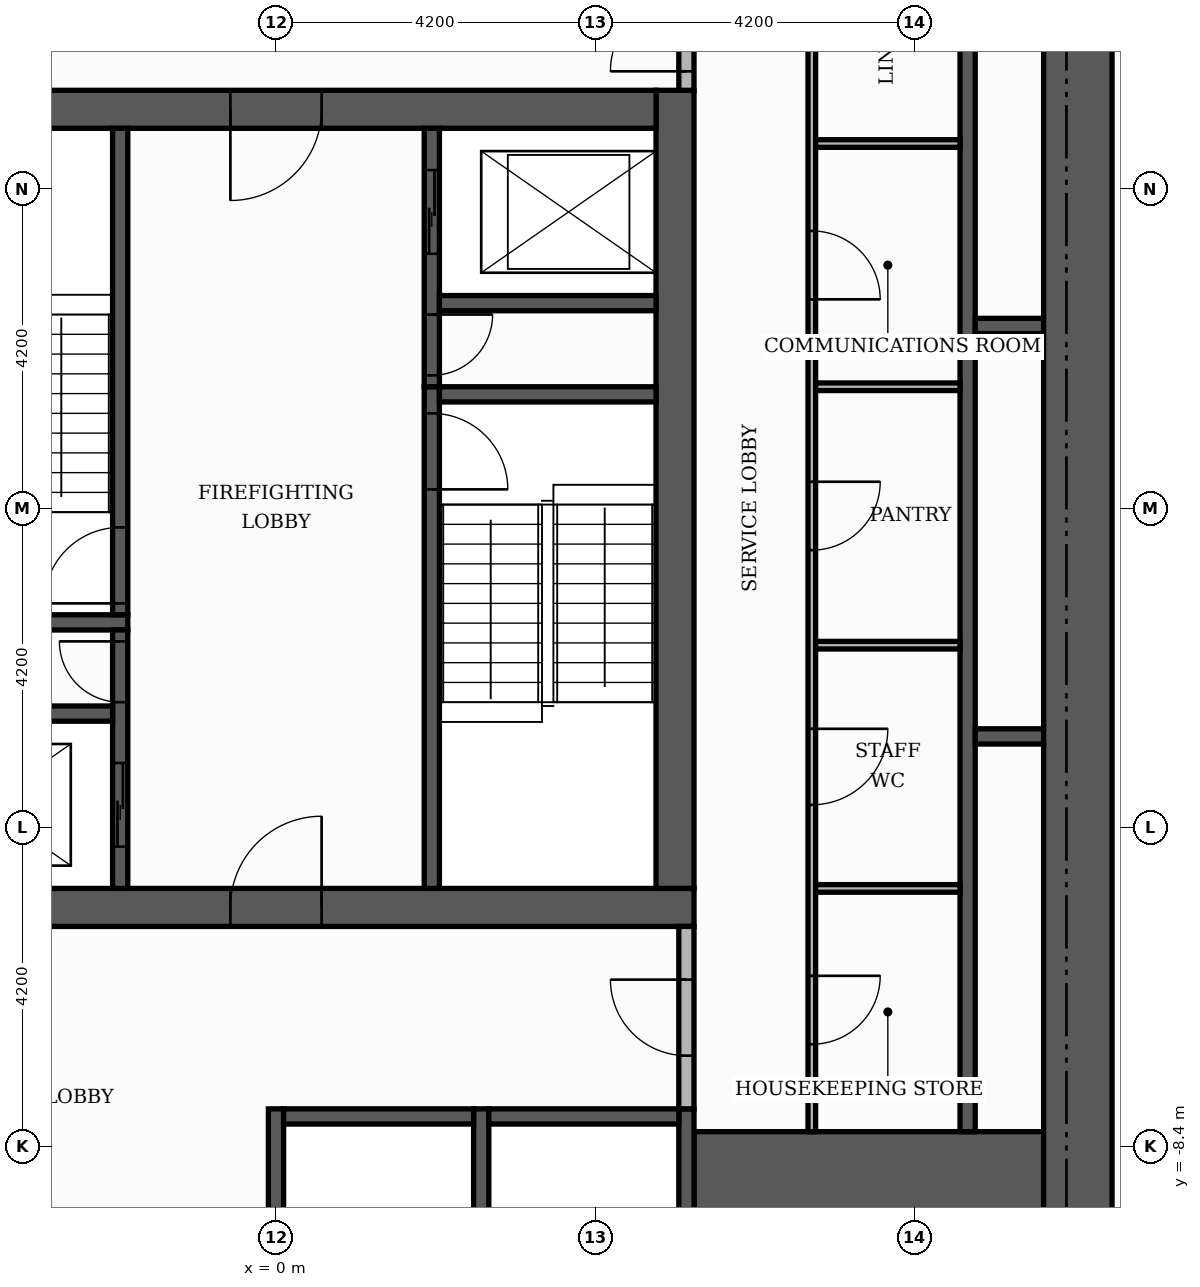
"""IFC4 building model, lengths in metres.
Left out: names, types, materials, properties, quantities, classifications, styles, units other than length and angle.
Written with IfcOpenShell. Run it as: python <this file> out.ifc"""

import sys

from ifc_helpers import new_model, si_unit, direction, frame, frame_2d, origin, place, context, subcontext, project, spatial, rectangle, extrude, element, fill, save


model = new_model("IFC4")
c1 = context("Model", 3, precision=1e-05, world=origin(), true_north=direction((0.0, 1.0)))
c2 = subcontext(c1, "Body", "Model", "MODEL_VIEW")
j1 = project(units=[si_unit("LENGTHUNIT", "METRE"), si_unit("PLANEANGLEUNIT", "RADIAN")], contexts=[c1])
p1 = place(None, origin())
s1 = spatial("IfcSite", under=j1, at=p1, CompositionType="ELEMENT")
p2 = place(p1, origin())
s2 = spatial("IfcBuilding", under=s1, at=p2, CompositionType="ELEMENT")
p3 = place(p2, frame((0.0, 0.0, 42.6)))
s3 = spatial("IfcBuildingStorey", under=s2, at=p3, CompositionType="ELEMENT", Elevation=42.6)
p4 = place(p3, frame((-5.5, -5.25, 0.0), z_axis=(0.0, 0.0, 1.0), x_axis=(1.0, 0.0, 0.0)))
e1 = element("IfcWall", 1, at=p4, inside=s3, PredefinedType="SHEAR", context=c2, shape_type="SweptSolid", body=[
    extrude(rectangle(XDim=11.0, YDim=0.5, at=frame_2d((5.5, 0.0))), origin(), (0.0, 0.0, 1.0), 3.48),
])
p5 = place(p4, frame((4.9, 0.0, 0.0)))
e2 = element("IfcOpeningElement", 2, at=p5, cuts=e1, PredefinedType="OPENING", context=c2, shape_type="SweptSolid", body=[
    extrude(rectangle(XDim=1.2, YDim=2.1, at=frame_2d((0.6, 1.05))), frame((0.0, 0.26, 0.0), z_axis=(0.0, -1.0, 0.0), x_axis=(1.0, 0.0, 0.0)), (0.0, 0.0, 1.0), 0.52),
])
p6 = place(p3, frame((5.25, -5.0, 0.0), z_axis=(0.0, 0.0, 1.0), x_axis=(0.0, 1.0, 0.0)))
e3 = element("IfcWall", 3, at=p6, inside=s3, PredefinedType="SHEAR", context=c2, shape_type="SweptSolid", body=[
    extrude(rectangle(XDim=10.5, YDim=0.5, at=frame_2d((5.25, 0.0))), origin(), (0.0, 0.0, 1.0), 3.48),
])
p7 = place(p3, frame((-5.0, 5.25, 0.0), z_axis=(0.0, 0.0, 1.0), x_axis=(1.0, 0.0, 0.0)))
e4 = element("IfcWall", 4, at=p7, inside=s3, PredefinedType="SHEAR", context=c2, shape_type="SweptSolid", body=[
    extrude(rectangle(XDim=10.0, YDim=0.5, at=frame_2d((5.0, 0.0))), origin(), (0.0, 0.0, 1.0), 3.48),
])
p8 = place(p7, frame((4.4, 0.0, 0.0)))
e5 = element("IfcOpeningElement", 5, at=p8, cuts=e4, PredefinedType="OPENING", context=c2, shape_type="SweptSolid", body=[
    extrude(rectangle(XDim=1.2, YDim=2.1, at=frame_2d((0.6, 1.05))), frame((0.0, 0.26, 0.0), z_axis=(0.0, -1.0, 0.0), x_axis=(1.0, 0.0, 0.0)), (0.0, 0.0, 1.0), 0.52),
])
p9 = place(p3, frame((5.5, -9.15, 0.0), z_axis=(0.0, 0.0, 1.0), x_axis=(1.0, 0.0, 0.0)))
e6 = element("IfcWall", 6, at=p9, inside=s3, PredefinedType="SHEAR", context=c2, shape_type="SweptSolid", body=[
    extrude(rectangle(XDim=4.6, YDim=1.9, at=frame_2d((2.3, 0.0))), origin(), (0.0, 0.0, 1.0), 3.48),
])
p10 = place(p3, frame((2.05, -5.0, 0.0), z_axis=(0.0, 0.0, 1.0), x_axis=(0.0, 1.0, 0.0)))
e7 = element("IfcWall", 7, at=p10, inside=s3, PredefinedType="SHEAR", context=c2, shape_type="SweptSolid", body=[
    extrude(rectangle(XDim=6.6, YDim=0.2, at=frame_2d((3.3, 0.0))), origin(), (0.0, 0.0, 1.0), 3.48),
])
p11 = place(p10, frame((5.25, 0.0, 0.0)))
e8 = element("IfcOpeningElement", 8, at=p11, cuts=e7, PredefinedType="OPENING", context=c2, shape_type="SweptSolid", body=[
    extrude(rectangle(XDim=1.0, YDim=2.1, at=frame_2d((0.5, 1.05))), frame((0.0, 0.11, 0.0), z_axis=(0.0, -1.0, 0.0), x_axis=(1.0, 0.0, 0.0)), (0.0, 0.0, 1.0), 0.22),
])
p12 = place(p3, frame((-5.0, -1.5, 0.0), z_axis=(0.0, 0.0, 1.0), x_axis=(1.0, 0.0, 0.0)))
e9 = element("IfcWall", 9, at=p12, inside=s3, PredefinedType="SHEAR", context=c2, shape_type="SweptSolid", body=[
    extrude(rectangle(XDim=3.05, YDim=0.2, at=frame_2d((1.525, 0.0))), origin(), (0.0, 0.0, 1.0), 3.48),
])
p13 = place(p3, frame((-2.05, -1.4, 0.0), z_axis=(0.0, 0.0, 1.0), x_axis=(0.0, 1.0, 0.0)))
e10 = element("IfcWall", 10, at=p13, inside=s3, PredefinedType="SHEAR", context=c2, shape_type="SweptSolid", body=[
    extrude(rectangle(XDim=6.4, YDim=0.2, at=frame_2d((3.2, 0.0))), origin(), (0.0, 0.0, 1.0), 3.48),
])
p14 = place(p13, frame((0.15, 0.0, 0.0)))
e11 = element("IfcOpeningElement", 11, at=p14, cuts=e10, PredefinedType="OPENING", context=c2, shape_type="SweptSolid", body=[
    extrude(rectangle(XDim=1.0, YDim=2.1, at=frame_2d((0.5, 1.05))), frame((0.0, 0.11, 0.0), z_axis=(0.0, -1.0, 0.0), x_axis=(1.0, 0.0, 0.0)), (0.0, 0.0, 1.0), 0.22),
])
p15 = place(p3, frame((2.15, 1.5, 0.0), z_axis=(0.0, 0.0, 1.0), x_axis=(1.0, 0.0, 0.0)))
e12 = element("IfcWall", 12, at=p15, inside=s3, PredefinedType="SHEAR", context=c2, shape_type="SweptSolid", body=[
    extrude(rectangle(XDim=2.85, YDim=0.2, at=frame_2d((1.425, 0.0))), origin(), (0.0, 0.0, 1.0), 3.48),
])
for number, where, z_axis, x_axis in (
    (13, (0.0, -10.1, 0.0), (0.0, 0.0, 1.0), (0.0, 1.0, 0.0)),
    (14, (2.7, -10.1, 0.0), (0.0, 0.0, 1.0), (0.0, 1.0, 0.0)),
    (15, (5.4, -10.1, 0.0), (0.0, 0.0, 1.0), (0.0, 1.0, 0.0)),
):
    element("IfcWall", number, at=place(p3, frame(where, z_axis=z_axis, x_axis=x_axis)), inside=s3, PredefinedType="SHEAR", context=c2, shape_type="SweptSolid", body=[
        extrude(rectangle(XDim=2.2, YDim=0.2, at=frame_2d((1.1, 0.0))), origin(), (0.0, 0.0, 1.0), 3.48),
    ])
p16 = place(p3, frame((9.1, -8.2, 0.0), z_axis=(0.0, 0.0, 1.0), x_axis=(0.0, 1.0, 0.0)))
e16 = element("IfcWall", 16, at=p16, inside=s3, PredefinedType="SHEAR", context=c2, shape_type="SweptSolid", body=[
    extrude(rectangle(XDim=16.4, YDim=0.2, at=frame_2d((8.2, 0.0))), origin(), (0.0, 0.0, 1.0), 3.48),
])
for number, where, z_axis, x_axis in (
    (17, (0.1, -8.0, 0.0), (0.0, 0.0, 1.0), (1.0, 0.0, 0.0)),
    (18, (2.8, -8.0, 0.0), (0.0, 0.0, 1.0), (1.0, 0.0, 0.0)),
):
    element("IfcWall", number, at=place(p3, frame(where, z_axis=z_axis, x_axis=x_axis)), inside=s3, PredefinedType="SHEAR", context=c2, shape_type="SweptSolid", body=[
        extrude(rectangle(XDim=2.5, YDim=0.2, at=frame_2d((1.25, 0.0))), origin(), (0.0, 0.0, 1.0), 3.48),
    ])
p17 = place(p3, frame((-2.05, -5.0, 0.0), z_axis=(0.0, 0.0, 1.0), x_axis=(0.0, 1.0, 0.0)))
e19 = element("IfcWall", 19, at=p17, inside=s3, PredefinedType="SHEAR", context=c2, shape_type="SweptSolid", body=[
    extrude(rectangle(XDim=3.4, YDim=0.2, at=frame_2d((1.7, 0.0))), origin(), (0.0, 0.0, 1.0), 3.48),
])
p18 = place(p17, frame((0.55, 0.0, 0.0)))
e20 = element("IfcOpeningElement", 20, at=p18, cuts=e19, PredefinedType="OPENING", context=c2, shape_type="SweptSolid", body=[
    extrude(rectangle(XDim=1.1, YDim=2.1, at=frame_2d((0.55, 1.05))), frame((0.0, 0.11, 0.0), z_axis=(0.0, -1.0, 0.0), x_axis=(1.0, 0.0, 0.0)), (0.0, 0.0, 1.0), 0.22),
])
p19 = place(p17, frame((2.45, 0.0, 0.0)))
e21 = element("IfcOpeningElement", 21, at=p19, cuts=e19, PredefinedType="OPENING", context=c2, shape_type="SweptSolid", body=[
    extrude(rectangle(XDim=0.8, YDim=2.1, at=frame_2d((0.4, 1.05))), frame((0.0, 0.11, 0.0), z_axis=(0.0, -1.0, 0.0), x_axis=(1.0, 0.0, 0.0)), (0.0, 0.0, 1.0), 0.22),
])
p20 = place(p3, frame((9.2, -3.0, 0.0), z_axis=(0.0, 0.0, 1.0), x_axis=(1.0, 0.0, 0.0)))
e22 = element("IfcWall", 22, at=p20, inside=s3, PredefinedType="SHEAR", context=c2, shape_type="SweptSolid", body=[
    extrude(rectangle(XDim=0.9, YDim=0.2, at=frame_2d((0.45, 0.0))), origin(), (0.0, 0.0, 1.0), 3.48),
])
p21 = place(p3, frame((-5.0, -2.7, 0.0), z_axis=(0.0, 0.0, 1.0), x_axis=(1.0, 0.0, 0.0)))
e23 = element("IfcWall", 23, at=p21, inside=s3, PredefinedType="SHEAR", context=c2, shape_type="SweptSolid", body=[
    extrude(rectangle(XDim=2.85, YDim=0.2, at=frame_2d((1.425, 0.0))), origin(), (0.0, 0.0, 1.0), 3.48),
])
p22 = place(p3, frame((2.05, 1.6, 0.0), z_axis=(0.0, 0.0, 1.0), x_axis=(0.0, 1.0, 0.0)))
e24 = element("IfcWall", 24, at=p22, inside=s3, PredefinedType="SHEAR", context=c2, shape_type="SweptSolid", body=[
    extrude(rectangle(XDim=3.4, YDim=0.2, at=frame_2d((1.7, 0.0))), origin(), (0.0, 0.0, 1.0), 3.48),
])
p23 = place(p22, frame((1.75, 0.0, 0.0)))
e25 = element("IfcOpeningElement", 25, at=p23, cuts=e24, PredefinedType="OPENING", context=c2, shape_type="SweptSolid", body=[
    extrude(rectangle(XDim=1.1, YDim=2.1, at=frame_2d((0.55, 1.05))), frame((0.0, 0.11, 0.0), z_axis=(0.0, -1.0, 0.0), x_axis=(1.0, 0.0, 0.0)), (0.0, 0.0, 1.0), 0.22),
])
p24 = place(p22, frame((0.15, 0.0, 0.0)))
e26 = element("IfcOpeningElement", 26, at=p24, cuts=e24, PredefinedType="OPENING", context=c2, shape_type="SweptSolid", body=[
    extrude(rectangle(XDim=0.8, YDim=2.1, at=frame_2d((0.4, 1.05))), frame((0.0, 0.11, 0.0), z_axis=(0.0, -1.0, 0.0), x_axis=(1.0, 0.0, 0.0)), (0.0, 0.0, 1.0), 0.22),
])
p25 = place(p3, frame((9.2, 2.4, 0.0), z_axis=(0.0, 0.0, 1.0), x_axis=(1.0, 0.0, 0.0)))
e27 = element("IfcWall", 27, at=p25, inside=s3, PredefinedType="SHEAR", context=c2, shape_type="SweptSolid", body=[
    extrude(rectangle(XDim=0.9, YDim=0.2, at=frame_2d((0.45, 0.0))), origin(), (0.0, 0.0, 1.0), 3.48),
])
p26 = place(p3, frame((2.15, 2.7, 0.0), z_axis=(0.0, 0.0, 1.0), x_axis=(1.0, 0.0, 0.0)))
e28 = element("IfcWall", 28, at=p26, inside=s3, PredefinedType="SHEAR", context=c2, shape_type="SweptSolid", body=[
    extrude(rectangle(XDim=2.85, YDim=0.2, at=frame_2d((1.425, 0.0))), origin(), (0.0, 0.0, 1.0), 3.48),
])
p27 = place(p3, frame((10.55, -10.1, 0.0), z_axis=(0.0, 0.0, 1.0), x_axis=(0.0, 1.0, 0.0)))
e29 = element("IfcWall", 29, at=p27, inside=s3, PredefinedType="SHEAR", context=c2, shape_type="SweptSolid", body=[
    extrude(rectangle(XDim=20.2, YDim=0.9, at=frame_2d((10.1, 0.0))), origin(), (0.0, 0.0, 1.0), 3.48),
])
p28 = place(p3, frame((7.05, -8.2, 0.0), z_axis=(0.0, 0.0, 1.0), x_axis=(0.0, 1.0, 0.0)))
e30 = element("IfcWall", 30, at=p28, inside=s3, PredefinedType="PARTITIONING", context=c2, shape_type="SweptSolid", body=[
    extrude(rectangle(XDim=16.4, YDim=0.1, at=frame_2d((8.2, 0.0))), origin(), (0.0, 0.0, 1.0), 3.48),
])
p29 = place(p28, frame((1.15, 0.0, 0.0)))
e31 = element("IfcOpeningElement", 31, at=p29, cuts=e30, PredefinedType="OPENING", context=c2, shape_type="SweptSolid", body=[
    extrude(rectangle(XDim=0.9, YDim=2.1, at=frame_2d((0.45, 1.05))), frame((0.0, 0.06, 0.0), z_axis=(0.0, -1.0, 0.0), x_axis=(1.0, 0.0, 0.0)), (0.0, 0.0, 1.0), 0.12),
])
p30 = place(p28, frame((4.3, 0.0, 0.0)))
e32 = element("IfcOpeningElement", 32, at=p30, cuts=e30, PredefinedType="OPENING", context=c2, shape_type="SweptSolid", body=[
    extrude(rectangle(XDim=1.0, YDim=2.1, at=frame_2d((0.5, 1.05))), frame((0.0, 0.06, 0.0), z_axis=(0.0, -1.0, 0.0), x_axis=(1.0, 0.0, 0.0)), (0.0, 0.0, 1.0), 0.12),
])
p31 = place(p28, frame((7.65, 0.0, 0.0)))
e33 = element("IfcOpeningElement", 33, at=p31, cuts=e30, PredefinedType="OPENING", context=c2, shape_type="SweptSolid", body=[
    extrude(rectangle(XDim=0.9, YDim=2.1, at=frame_2d((0.45, 1.05))), frame((0.0, 0.06, 0.0), z_axis=(0.0, -1.0, 0.0), x_axis=(1.0, 0.0, 0.0)), (0.0, 0.0, 1.0), 0.12),
])
p32 = place(p28, frame((10.95, 0.0, 0.0)))
e34 = element("IfcOpeningElement", 34, at=p32, cuts=e30, PredefinedType="OPENING", context=c2, shape_type="SweptSolid", body=[
    extrude(rectangle(XDim=0.9, YDim=2.1, at=frame_2d((0.45, 1.05))), frame((0.0, 0.06, 0.0), z_axis=(0.0, -1.0, 0.0), x_axis=(1.0, 0.0, 0.0)), (0.0, 0.0, 1.0), 0.12),
])
p33 = place(p28, frame((14.25, 0.0, 0.0)))
e35 = element("IfcOpeningElement", 35, at=p33, cuts=e30, PredefinedType="OPENING", context=c2, shape_type="SweptSolid", body=[
    extrude(rectangle(XDim=0.9, YDim=2.1, at=frame_2d((0.45, 1.05))), frame((0.0, 0.06, 0.0), z_axis=(0.0, -1.0, 0.0), x_axis=(1.0, 0.0, 0.0)), (0.0, 0.0, 1.0), 0.12),
])
p34 = place(p3, frame((5.4, -7.9, 0.0), z_axis=(0.0, 0.0, 1.0), x_axis=(0.0, 1.0, 0.0)))
e36 = element("IfcWall", 36, at=p34, inside=s3, PredefinedType="PARTITIONING", context=c2, shape_type="SweptSolid", body=[
    extrude(rectangle(XDim=2.4, YDim=0.2, at=frame_2d((1.2, 0.0))), origin(), (0.0, 0.0, 1.0), 3.48),
])
p35 = place(p34, frame((0.7, 0.0, 0.0)))
e37 = element("IfcOpeningElement", 37, at=p35, cuts=e36, PredefinedType="OPENING", context=c2, shape_type="SweptSolid", body=[
    extrude(rectangle(XDim=1.0, YDim=2.1, at=frame_2d((0.5, 1.05))), frame((0.0, 0.11, 0.0), z_axis=(0.0, -1.0, 0.0), x_axis=(1.0, 0.0, 0.0)), (0.0, 0.0, 1.0), 0.22),
])
for number, where, z_axis, x_axis in (
    (38, (7.1, -5.0, 0.0), (0.0, 0.0, 1.0), (1.0, 0.0, 0.0)),
    (39, (7.1, -1.8, 0.0), (0.0, 0.0, 1.0), (1.0, 0.0, 0.0)),
    (40, (7.1, 1.6, 0.0), (0.0, 0.0, 1.0), (1.0, 0.0, 0.0)),
    (41, (7.1, 4.8, 0.0), (0.0, 0.0, 1.0), (1.0, 0.0, 0.0)),
):
    element("IfcWall", number, at=place(p3, frame(where, z_axis=z_axis, x_axis=x_axis)), inside=s3, PredefinedType="PARTITIONING", context=c2, shape_type="SweptSolid", body=[
        extrude(rectangle(XDim=1.9, YDim=0.1, at=frame_2d((0.95, 0.0))), origin(), (0.0, 0.0, 1.0), 3.48),
    ])
p36 = place(p3, frame((5.4, 5.5, 0.0), z_axis=(0.0, 0.0, 1.0), x_axis=(0.0, 1.0, 0.0)))
e42 = element("IfcWall", 42, at=p36, inside=s3, PredefinedType="PARTITIONING", context=c2, shape_type="SweptSolid", body=[
    extrude(rectangle(XDim=4.6, YDim=0.2, at=frame_2d((2.3, 0.0))), origin(), (0.0, 0.0, 1.0), 3.48),
])
p37 = place(p36, frame((0.25, 0.0, 0.0)))
e43 = element("IfcOpeningElement", 43, at=p37, cuts=e42, PredefinedType="OPENING", context=c2, shape_type="SweptSolid", body=[
    extrude(rectangle(XDim=1.0, YDim=2.1, at=frame_2d((0.5, 1.05))), frame((0.0, 0.11, 0.0), z_axis=(0.0, -1.0, 0.0), x_axis=(1.0, 0.0, 0.0)), (0.0, 0.0, 1.0), 0.22),
])
p38 = place(p23, origin())
e44 = element("IfcDoor", 44, at=p38, inside=s3, OperationType="SLIDING_TO_LEFT", PredefinedType="DOOR", context=c2, shape_type="SweptSolid", body=[
    extrude(rectangle(XDim=1.1, YDim=2.1, at=frame_2d((0.55, 1.05))), frame((0.0, 0.025, 0.0), z_axis=(0.0, -1.0, 0.0), x_axis=(1.0, 0.0, 0.0)), (0.0, 0.0, 1.0), 0.05),
])
fill(e25, e44)
p39 = place(p18, origin())
e45 = element("IfcDoor", 45, at=p39, inside=s3, OperationType="SLIDING_TO_LEFT", PredefinedType="DOOR", context=c2, shape_type="SweptSolid", body=[
    extrude(rectangle(XDim=1.1, YDim=2.1, at=frame_2d((0.55, 1.05))), frame((0.0, 0.025, 0.0), z_axis=(0.0, -1.0, 0.0), x_axis=(1.0, 0.0, 0.0)), (0.0, 0.0, 1.0), 0.05),
])
fill(e20, e45)
p40 = place(p14, origin())
e46 = element("IfcDoor", 46, at=p40, inside=s3, OperationType="SINGLE_SWING_LEFT", PredefinedType="DOOR", context=c2, shape_type="SweptSolid", body=[
    extrude(rectangle(XDim=1.0, YDim=2.1, at=frame_2d((0.5, 1.05))), frame((0.0, 0.025, 0.0), z_axis=(0.0, -1.0, 0.0), x_axis=(1.0, 0.0, 0.0)), (0.0, 0.0, 1.0), 0.05),
])
fill(e11, e46)
p41 = place(p11, frame((1.0, 0.0, 0.0), z_axis=(0.0, 0.0, 1.0), x_axis=(-1.0, 0.0, 0.0)))
e47 = element("IfcDoor", 47, at=p41, inside=s3, OperationType="SINGLE_SWING_LEFT", PredefinedType="DOOR", context=c2, shape_type="SweptSolid", body=[
    extrude(rectangle(XDim=1.0, YDim=2.1, at=frame_2d((0.5, 1.05))), frame((0.0, 0.025, 0.0), z_axis=(0.0, -1.0, 0.0), x_axis=(1.0, 0.0, 0.0)), (0.0, 0.0, 1.0), 0.05),
])
fill(e8, e47)
p42 = place(p24, frame((0.8, 0.0, 0.0), z_axis=(0.0, 0.0, 1.0), x_axis=(-1.0, 0.0, 0.0)))
e48 = element("IfcDoor", 48, at=p42, inside=s3, OperationType="SINGLE_SWING_RIGHT", PredefinedType="DOOR", context=c2, shape_type="SweptSolid", body=[
    extrude(rectangle(XDim=0.8, YDim=2.1, at=frame_2d((0.4, 1.05))), frame((0.0, 0.025, 0.0), z_axis=(0.0, -1.0, 0.0), x_axis=(1.0, 0.0, 0.0)), (0.0, 0.0, 1.0), 0.05),
])
fill(e26, e48)
p43 = place(p19, origin())
e49 = element("IfcDoor", 49, at=p43, inside=s3, OperationType="SINGLE_SWING_RIGHT", PredefinedType="DOOR", context=c2, shape_type="SweptSolid", body=[
    extrude(rectangle(XDim=0.8, YDim=2.1, at=frame_2d((0.4, 1.05))), frame((0.0, 0.025, 0.0), z_axis=(0.0, -1.0, 0.0), x_axis=(1.0, 0.0, 0.0)), (0.0, 0.0, 1.0), 0.05),
])
fill(e21, e49)
p44 = place(p8, frame((1.2, 0.0, 0.0), z_axis=(0.0, 0.0, 1.0), x_axis=(-1.0, 0.0, 0.0)))
e50 = element("IfcDoor", 50, at=p44, inside=s3, OperationType="SINGLE_SWING_LEFT", PredefinedType="DOOR", context=c2, shape_type="SweptSolid", body=[
    extrude(rectangle(XDim=1.2, YDim=2.1, at=frame_2d((0.6, 1.05))), frame((0.0, 0.025, 0.0), z_axis=(0.0, -1.0, 0.0), x_axis=(1.0, 0.0, 0.0)), (0.0, 0.0, 1.0), 0.05),
])
fill(e5, e50)
p45 = place(p5, origin())
e51 = element("IfcDoor", 51, at=p45, inside=s3, OperationType="SINGLE_SWING_RIGHT", PredefinedType="DOOR", context=c2, shape_type="SweptSolid", body=[
    extrude(rectangle(XDim=1.2, YDim=2.1, at=frame_2d((0.6, 1.05))), frame((0.0, 0.025, 0.0), z_axis=(0.0, -1.0, 0.0), x_axis=(1.0, 0.0, 0.0)), (0.0, 0.0, 1.0), 0.05),
])
fill(e2, e51)
p46 = place(p37, origin())
e52 = element("IfcDoor", 52, at=p46, inside=s3, OperationType="SINGLE_SWING_LEFT", PredefinedType="DOOR", context=c2, shape_type="SweptSolid", body=[
    extrude(rectangle(XDim=1.0, YDim=2.1, at=frame_2d((0.5, 1.05))), frame((0.0, 0.025, 0.0), z_axis=(0.0, -1.0, 0.0), x_axis=(1.0, 0.0, 0.0)), (0.0, 0.0, 1.0), 0.05),
])
fill(e43, e52)
p47 = place(p35, origin())
e53 = element("IfcDoor", 53, at=p47, inside=s3, OperationType="SINGLE_SWING_RIGHT", PredefinedType="DOOR", context=c2, shape_type="SweptSolid", body=[
    extrude(rectangle(XDim=1.0, YDim=2.1, at=frame_2d((0.5, 1.05))), frame((0.0, 0.025, 0.0), z_axis=(0.0, -1.0, 0.0), x_axis=(1.0, 0.0, 0.0)), (0.0, 0.0, 1.0), 0.05),
])
fill(e37, e53)
p48 = place(p29, frame((0.9, 0.0, 0.0), z_axis=(0.0, 0.0, 1.0), x_axis=(-1.0, 0.0, 0.0)))
e54 = element("IfcDoor", 54, at=p48, inside=s3, OperationType="SINGLE_SWING_RIGHT", PredefinedType="DOOR", context=c2, shape_type="SweptSolid", body=[
    extrude(rectangle(XDim=0.9, YDim=2.1, at=frame_2d((0.45, 1.05))), frame((0.0, 0.025, 0.0), z_axis=(0.0, -1.0, 0.0), x_axis=(1.0, 0.0, 0.0)), (0.0, 0.0, 1.0), 0.05),
])
fill(e31, e54)
p49 = place(p30, frame((1.0, 0.0, 0.0), z_axis=(0.0, 0.0, 1.0), x_axis=(-1.0, 0.0, 0.0)))
e55 = element("IfcDoor", 55, at=p49, inside=s3, OperationType="SINGLE_SWING_RIGHT", PredefinedType="DOOR", context=c2, shape_type="SweptSolid", body=[
    extrude(rectangle(XDim=1.0, YDim=2.1, at=frame_2d((0.5, 1.05))), frame((0.0, 0.025, 0.0), z_axis=(0.0, -1.0, 0.0), x_axis=(1.0, 0.0, 0.0)), (0.0, 0.0, 1.0), 0.05),
])
fill(e32, e55)
p50 = place(p31, frame((0.9, 0.0, 0.0), z_axis=(0.0, 0.0, 1.0), x_axis=(-1.0, 0.0, 0.0)))
e56 = element("IfcDoor", 56, at=p50, inside=s3, OperationType="SINGLE_SWING_RIGHT", PredefinedType="DOOR", context=c2, shape_type="SweptSolid", body=[
    extrude(rectangle(XDim=0.9, YDim=2.1, at=frame_2d((0.45, 1.05))), frame((0.0, 0.025, 0.0), z_axis=(0.0, -1.0, 0.0), x_axis=(1.0, 0.0, 0.0)), (0.0, 0.0, 1.0), 0.05),
])
fill(e33, e56)
p51 = place(p32, frame((0.9, 0.0, 0.0), z_axis=(0.0, 0.0, 1.0), x_axis=(-1.0, 0.0, 0.0)))
e57 = element("IfcDoor", 57, at=p51, inside=s3, OperationType="SINGLE_SWING_LEFT", PredefinedType="DOOR", context=c2, shape_type="SweptSolid", body=[
    extrude(rectangle(XDim=0.9, YDim=2.1, at=frame_2d((0.45, 1.05))), frame((0.0, 0.025, 0.0), z_axis=(0.0, -1.0, 0.0), x_axis=(1.0, 0.0, 0.0)), (0.0, 0.0, 1.0), 0.05),
])
fill(e34, e57)
save(model, sys.argv[1])
